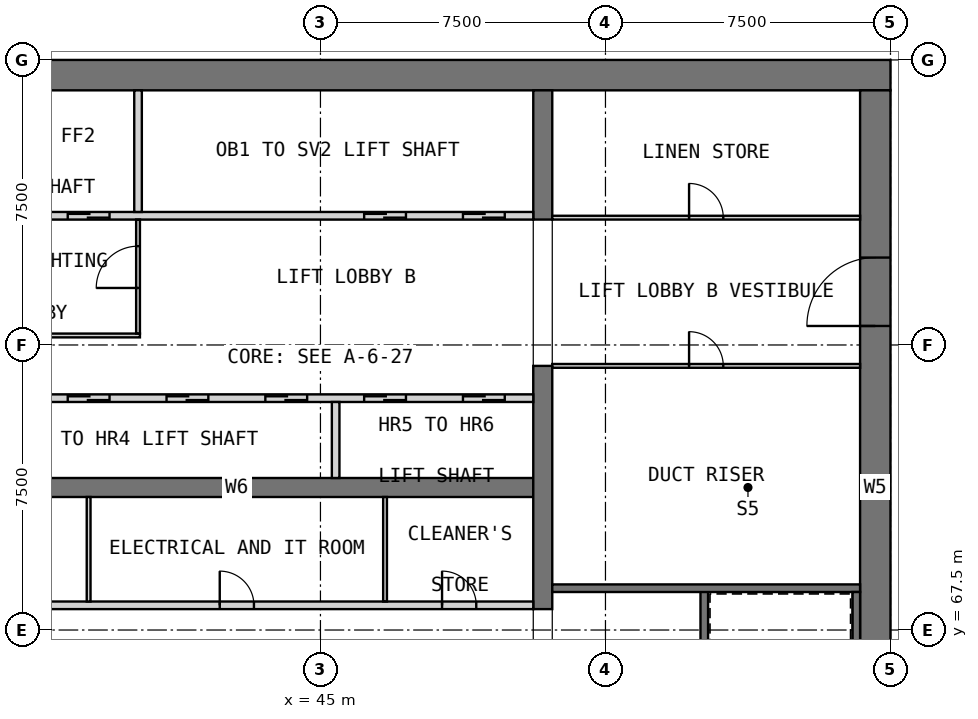
"""IFC4 building model, lengths in metres.
Left out: names, types, materials, properties, quantities, classifications, styles, units other than length and angle.
Written with IfcOpenShell. Run it as: python <this file> out.ifc"""

import sys

from ifc_helpers import new_model, si_unit, direction, frame, frame_2d, origin, place, context, subcontext, project, spatial, rectangle, extrude, element, fill, save


model = new_model("IFC4")
c1 = context("Model", 3, precision=1e-05, world=origin(), true_north=direction((0.0, 1.0)))
c2 = subcontext(c1, "Body", "Model", "MODEL_VIEW")
j1 = project(units=[si_unit("LENGTHUNIT", "METRE"), si_unit("PLANEANGLEUNIT", "RADIAN")], contexts=[c1])
p1 = place(None, origin())
s1 = spatial("IfcSite", under=j1, at=p1, CompositionType="ELEMENT")
p2 = place(p1, origin())
s2 = spatial("IfcBuilding", under=s1, at=p2, CompositionType="ELEMENT")
p3 = place(p2, frame((0.0, 0.0, 189.7)))
s3 = spatial("IfcBuildingStorey", under=s2, at=p3, CompositionType="ELEMENT", Elevation=189.7)
p4 = place(p3, frame((30.0, 82.1, 0.0), z_axis=(0.0, 0.0, 1.0), x_axis=(1.0, 0.0, 0.0)))
e1 = element("IfcWall", 1, at=p4, inside=s3, PredefinedType="SHEAR", context=c2, shape_type="SweptSolid", body=[
    extrude(rectangle(XDim=30.0, YDim=0.8, at=frame_2d((15.0, 0.0))), origin(), (0.0, 0.0, 1.0), 3.5),
])
p5 = place(p3, frame((59.6, 60.8, 0.0), z_axis=(0.0, 0.0, 1.0), x_axis=(0.0, 1.0, 0.0)))
e2 = element("IfcWall", 2, at=p5, inside=s3, PredefinedType="SHEAR", context=c2, shape_type="SweptSolid", body=[
    extrude(rectangle(XDim=20.9, YDim=0.8, at=frame_2d((10.45, 0.0))), origin(), (0.0, 0.0, 1.0), 3.5),
])
p6 = place(p5, frame((14.7, 0.0, 0.0)))
e3 = element("IfcOpeningElement", 3, at=p6, cuts=e2, PredefinedType="OPENING", context=c2, shape_type="SweptSolid", body=[
    extrude(rectangle(XDim=1.8, YDim=2.1, at=frame_2d((0.9, 1.05))), frame((0.0, 0.41, 0.0), z_axis=(0.0, -1.0, 0.0), x_axis=(1.0, 0.0, 0.0)), (0.0, 0.0, 1.0), 0.82),
])
p7 = place(p3, frame((35.0, 71.25, 0.0), z_axis=(0.0, 0.0, 1.0), x_axis=(1.0, 0.0, 0.0)))
e4 = element("IfcWall", 4, at=p7, inside=s3, PredefinedType="SHEAR", context=c2, shape_type="SweptSolid", body=[
    extrude(rectangle(XDim=15.6, YDim=0.5, at=frame_2d((7.8, 0.0))), origin(), (0.0, 0.0, 1.0), 3.5),
])
p8 = place(p3, frame((50.85, 68.05, 0.0), z_axis=(0.0, 0.0, 1.0), x_axis=(0.0, 1.0, 0.0)))
e5 = element("IfcWall", 5, at=p8, inside=s3, PredefinedType="SHEAR", context=c2, shape_type="SweptSolid", body=[
    extrude(rectangle(XDim=6.4, YDim=0.5, at=frame_2d((3.2, 0.0))), origin(), (0.0, 0.0, 1.0), 3.5),
])
p9 = place(p3, frame((50.85, 78.3, 0.0), z_axis=(0.0, 0.0, 1.0), x_axis=(0.0, 1.0, 0.0)))
e6 = element("IfcWall", 6, at=p9, inside=s3, PredefinedType="SHEAR", context=c2, shape_type="SweptSolid", body=[
    extrude(rectangle(XDim=3.4, YDim=0.5, at=frame_2d((1.7, 0.0))), origin(), (0.0, 0.0, 1.0), 3.5),
])
p10 = place(p3, frame((35.0, 68.15, 0.0), z_axis=(0.0, 0.0, 1.0), x_axis=(1.0, 0.0, 0.0)))
e7 = element("IfcWall", 7, at=p10, inside=s3, PredefinedType="PARTITIONING", context=c2, shape_type="SweptSolid", body=[
    extrude(rectangle(XDim=15.6, YDim=0.2, at=frame_2d((7.8, 0.0))), origin(), (0.0, 0.0, 1.0), 3.25),
])
p11 = place(p10, frame((1.5, 0.0, 0.0)))
e8 = element("IfcOpeningElement", 8, at=p11, cuts=e7, PredefinedType="OPENING", context=c2, shape_type="SweptSolid", body=[
    extrude(rectangle(XDim=0.9, YDim=2.1, at=frame_2d((0.45, 1.05))), frame((0.0, 0.11, 0.0), z_axis=(0.0, -1.0, 0.0), x_axis=(1.0, 0.0, 0.0)), (0.0, 0.0, 1.0), 0.22),
])
p12 = place(p10, frame((7.35, 0.0, 0.0)))
e9 = element("IfcOpeningElement", 9, at=p12, cuts=e7, PredefinedType="OPENING", context=c2, shape_type="SweptSolid", body=[
    extrude(rectangle(XDim=0.9, YDim=2.1, at=frame_2d((0.45, 1.05))), frame((0.0, 0.11, 0.0), z_axis=(0.0, -1.0, 0.0), x_axis=(1.0, 0.0, 0.0)), (0.0, 0.0, 1.0), 0.22),
])
p13 = place(p10, frame((13.2, 0.0, 0.0)))
e10 = element("IfcOpeningElement", 10, at=p13, cuts=e7, PredefinedType="OPENING", context=c2, shape_type="SweptSolid", body=[
    extrude(rectangle(XDim=0.9, YDim=2.1, at=frame_2d((0.45, 1.05))), frame((0.0, 0.11, 0.0), z_axis=(0.0, -1.0, 0.0), x_axis=(1.0, 0.0, 0.0)), (0.0, 0.0, 1.0), 0.22),
])
for number, where, z_axis, x_axis in (
    (11, (38.9, 68.25, 0.0), (0.0, 0.0, 1.0), (0.0, 1.0, 0.0)),
    (12, (46.7, 68.25, 0.0), (0.0, 0.0, 1.0), (0.0, 1.0, 0.0)),
):
    element("IfcWall", number, at=place(p3, frame(where, z_axis=z_axis, x_axis=x_axis)), inside=s3, PredefinedType="PARTITIONING", context=c2, shape_type="SweptSolid", body=[
        extrude(rectangle(XDim=2.75, YDim=0.1, at=frame_2d((1.375, 0.0))), origin(), (0.0, 0.0, 1.0), 3.25),
    ])
p14 = place(p3, frame((35.0, 73.6, 0.0), z_axis=(0.0, 0.0, 1.0), x_axis=(1.0, 0.0, 0.0)))
e13 = element("IfcWall", 13, at=p14, inside=s3, PredefinedType="SOLIDWALL", context=c2, shape_type="SweptSolid", body=[
    extrude(rectangle(XDim=15.6, YDim=0.2, at=frame_2d((7.8, 0.0))), origin(), (0.0, 0.0, 1.0), 3.5),
])
p15 = place(p14, frame((0.75, 0.0, 0.0)))
e14 = element("IfcOpeningElement", 14, at=p15, cuts=e13, PredefinedType="OPENING", context=c2, shape_type="SweptSolid", body=[
    extrude(rectangle(XDim=1.1, YDim=2.1, at=frame_2d((0.55, 1.05))), frame((0.0, 0.11, 0.0), z_axis=(0.0, -1.0, 0.0), x_axis=(1.0, 0.0, 0.0)), (0.0, 0.0, 1.0), 0.22),
])
p16 = place(p14, frame((3.35, 0.0, 0.0)))
e15 = element("IfcOpeningElement", 15, at=p16, cuts=e13, PredefinedType="OPENING", context=c2, shape_type="SweptSolid", body=[
    extrude(rectangle(XDim=1.1, YDim=2.1, at=frame_2d((0.55, 1.05))), frame((0.0, 0.11, 0.0), z_axis=(0.0, -1.0, 0.0), x_axis=(1.0, 0.0, 0.0)), (0.0, 0.0, 1.0), 0.22),
])
p17 = place(p14, frame((5.95, 0.0, 0.0)))
e16 = element("IfcOpeningElement", 16, at=p17, cuts=e13, PredefinedType="OPENING", context=c2, shape_type="SweptSolid", body=[
    extrude(rectangle(XDim=1.1, YDim=2.1, at=frame_2d((0.55, 1.05))), frame((0.0, 0.11, 0.0), z_axis=(0.0, -1.0, 0.0), x_axis=(1.0, 0.0, 0.0)), (0.0, 0.0, 1.0), 0.22),
])
p18 = place(p14, frame((8.55, 0.0, 0.0)))
e17 = element("IfcOpeningElement", 17, at=p18, cuts=e13, PredefinedType="OPENING", context=c2, shape_type="SweptSolid", body=[
    extrude(rectangle(XDim=1.1, YDim=2.1, at=frame_2d((0.55, 1.05))), frame((0.0, 0.11, 0.0), z_axis=(0.0, -1.0, 0.0), x_axis=(1.0, 0.0, 0.0)), (0.0, 0.0, 1.0), 0.22),
])
p19 = place(p14, frame((11.15, 0.0, 0.0)))
e18 = element("IfcOpeningElement", 18, at=p19, cuts=e13, PredefinedType="OPENING", context=c2, shape_type="SweptSolid", body=[
    extrude(rectangle(XDim=1.1, YDim=2.1, at=frame_2d((0.55, 1.05))), frame((0.0, 0.11, 0.0), z_axis=(0.0, -1.0, 0.0), x_axis=(1.0, 0.0, 0.0)), (0.0, 0.0, 1.0), 0.22),
])
p20 = place(p14, frame((13.75, 0.0, 0.0)))
e19 = element("IfcOpeningElement", 19, at=p20, cuts=e13, PredefinedType="OPENING", context=c2, shape_type="SweptSolid", body=[
    extrude(rectangle(XDim=1.1, YDim=2.1, at=frame_2d((0.55, 1.05))), frame((0.0, 0.11, 0.0), z_axis=(0.0, -1.0, 0.0), x_axis=(1.0, 0.0, 0.0)), (0.0, 0.0, 1.0), 0.22),
])
p21 = place(p3, frame((45.4, 71.5, 0.0), z_axis=(0.0, 0.0, 1.0), x_axis=(0.0, 1.0, 0.0)))
e20 = element("IfcWall", 20, at=p21, inside=s3, PredefinedType="SOLIDWALL", context=c2, shape_type="SweptSolid", body=[
    extrude(rectangle(XDim=2.0, YDim=0.2, at=frame_2d((1.0, 0.0))), origin(), (0.0, 0.0, 1.0), 3.5),
])
p22 = place(p3, frame((35.0, 78.4, 0.0), z_axis=(0.0, 0.0, 1.0), x_axis=(1.0, 0.0, 0.0)))
e21 = element("IfcWall", 21, at=p22, inside=s3, PredefinedType="SOLIDWALL", context=c2, shape_type="SweptSolid", body=[
    extrude(rectangle(XDim=15.6, YDim=0.2, at=frame_2d((7.8, 0.0))), origin(), (0.0, 0.0, 1.0), 3.5),
])
p23 = place(p22, frame((0.75, 0.0, 0.0)))
e22 = element("IfcOpeningElement", 22, at=p23, cuts=e21, PredefinedType="OPENING", context=c2, shape_type="SweptSolid", body=[
    extrude(rectangle(XDim=1.1, YDim=2.1, at=frame_2d((0.55, 1.05))), frame((0.0, 0.11, 0.0), z_axis=(0.0, -1.0, 0.0), x_axis=(1.0, 0.0, 0.0)), (0.0, 0.0, 1.0), 0.22),
])
p24 = place(p22, frame((3.35, 0.0, 0.0)))
e23 = element("IfcOpeningElement", 23, at=p24, cuts=e21, PredefinedType="OPENING", context=c2, shape_type="SweptSolid", body=[
    extrude(rectangle(XDim=1.1, YDim=2.1, at=frame_2d((0.55, 1.05))), frame((0.0, 0.11, 0.0), z_axis=(0.0, -1.0, 0.0), x_axis=(1.0, 0.0, 0.0)), (0.0, 0.0, 1.0), 0.22),
])
p25 = place(p22, frame((11.15, 0.0, 0.0)))
e24 = element("IfcOpeningElement", 24, at=p25, cuts=e21, PredefinedType="OPENING", context=c2, shape_type="SweptSolid", body=[
    extrude(rectangle(XDim=1.1, YDim=2.1, at=frame_2d((0.55, 1.05))), frame((0.0, 0.11, 0.0), z_axis=(0.0, -1.0, 0.0), x_axis=(1.0, 0.0, 0.0)), (0.0, 0.0, 1.0), 0.22),
])
p26 = place(p22, frame((13.75, 0.0, 0.0)))
e25 = element("IfcOpeningElement", 25, at=p26, cuts=e21, PredefinedType="OPENING", context=c2, shape_type="SweptSolid", body=[
    extrude(rectangle(XDim=1.1, YDim=2.1, at=frame_2d((0.55, 1.05))), frame((0.0, 0.11, 0.0), z_axis=(0.0, -1.0, 0.0), x_axis=(1.0, 0.0, 0.0)), (0.0, 0.0, 1.0), 0.22),
])
p27 = place(p3, frame((40.2, 78.5, 0.0), z_axis=(0.0, 0.0, 1.0), x_axis=(0.0, 1.0, 0.0)))
e26 = element("IfcWall", 26, at=p27, inside=s3, PredefinedType="SOLIDWALL", context=c2, shape_type="SweptSolid", body=[
    extrude(rectangle(XDim=3.2, YDim=0.2, at=frame_2d((1.6, 0.0))), origin(), (0.0, 0.0, 1.0), 3.5),
])
p28 = place(p3, frame((35.0, 75.25, 0.0), z_axis=(0.0, 0.0, 1.0), x_axis=(1.0, 0.0, 0.0)))
e27 = element("IfcWall", 27, at=p28, inside=s3, PredefinedType="PARTITIONING", context=c2, shape_type="SweptSolid", body=[
    extrude(rectangle(XDim=5.25, YDim=0.1, at=frame_2d((2.625, 0.0))), origin(), (0.0, 0.0, 1.0), 3.25),
])
p29 = place(p3, frame((40.2, 75.3, 0.0), z_axis=(0.0, 0.0, 1.0), x_axis=(0.0, 1.0, 0.0)))
e28 = element("IfcWall", 28, at=p29, inside=s3, PredefinedType="PARTITIONING", context=c2, shape_type="SweptSolid", body=[
    extrude(rectangle(XDim=3.0, YDim=0.1, at=frame_2d((1.5, 0.0))), origin(), (0.0, 0.0, 1.0), 3.25),
])
p30 = place(p29, frame((1.2, 0.0, 0.0)))
e29 = element("IfcOpeningElement", 29, at=p30, cuts=e28, PredefinedType="OPENING", context=c2, shape_type="SweptSolid", body=[
    extrude(rectangle(XDim=1.1, YDim=2.1, at=frame_2d((0.55, 1.05))), frame((0.0, 0.06, 0.0), z_axis=(0.0, -1.0, 0.0), x_axis=(1.0, 0.0, 0.0)), (0.0, 0.0, 1.0), 0.12),
])
p31 = place(p3, frame((55.1, 60.8, 0.0), z_axis=(0.0, 0.0, 1.0), x_axis=(0.0, 1.0, 0.0)))
e30 = element("IfcWall", 30, at=p31, inside=s3, PredefinedType="SOLIDWALL", context=c2, shape_type="SweptSolid", body=[
    extrude(rectangle(XDim=7.8, YDim=0.2, at=frame_2d((3.9, 0.0))), origin(), (0.0, 0.0, 1.0), 3.25),
])
p32 = place(p3, frame((51.1, 68.6, 0.0), z_axis=(0.0, 0.0, 1.0), x_axis=(1.0, 0.0, 0.0)))
e31 = element("IfcWall", 31, at=p32, inside=s3, PredefinedType="SOLIDWALL", context=c2, shape_type="SweptSolid", body=[
    extrude(rectangle(XDim=8.1, YDim=0.2, at=frame_2d((4.05, 0.0))), origin(), (0.0, 0.0, 1.0), 3.25),
])
p33 = place(p3, frame((59.1, 60.8, 0.0), z_axis=(0.0, 0.0, 1.0), x_axis=(0.0, 1.0, 0.0)))
e32 = element("IfcWall", 32, at=p33, inside=s3, PredefinedType="SOLIDWALL", context=c2, shape_type="SweptSolid", body=[
    extrude(rectangle(XDim=7.7, YDim=0.2, at=frame_2d((3.85, 0.0))), origin(), (0.0, 0.0, 1.0), 3.25),
])
p34 = place(p3, frame((51.1, 74.45, 0.0), z_axis=(0.0, 0.0, 1.0), x_axis=(1.0, 0.0, 0.0)))
e33 = element("IfcWall", 33, at=p34, inside=s3, PredefinedType="PARTITIONING", context=c2, shape_type="SweptSolid", body=[
    extrude(rectangle(XDim=8.1, YDim=0.1, at=frame_2d((4.05, 0.0))), origin(), (0.0, 0.0, 1.0), 3.25),
])
p35 = place(p34, frame((3.6, 0.0, 0.0)))
e34 = element("IfcOpeningElement", 34, at=p35, cuts=e33, PredefinedType="OPENING", context=c2, shape_type="SweptSolid", body=[
    extrude(rectangle(XDim=0.9, YDim=2.1, at=frame_2d((0.45, 1.05))), frame((0.0, 0.06, 0.0), z_axis=(0.0, -1.0, 0.0), x_axis=(1.0, 0.0, 0.0)), (0.0, 0.0, 1.0), 0.12),
])
p36 = place(p3, frame((51.1, 78.35, 0.0), z_axis=(0.0, 0.0, 1.0), x_axis=(1.0, 0.0, 0.0)))
e35 = element("IfcWall", 35, at=p36, inside=s3, PredefinedType="PARTITIONING", context=c2, shape_type="SweptSolid", body=[
    extrude(rectangle(XDim=8.1, YDim=0.1, at=frame_2d((4.05, 0.0))), origin(), (0.0, 0.0, 1.0), 3.25),
])
p37 = place(p36, frame((3.6, 0.0, 0.0)))
e36 = element("IfcOpeningElement", 36, at=p37, cuts=e35, PredefinedType="OPENING", context=c2, shape_type="SweptSolid", body=[
    extrude(rectangle(XDim=0.9, YDim=2.1, at=frame_2d((0.45, 1.05))), frame((0.0, 0.06, 0.0), z_axis=(0.0, -1.0, 0.0), x_axis=(1.0, 0.0, 0.0)), (0.0, 0.0, 1.0), 0.12),
])
p38 = place(p12, origin())
e37 = element("IfcDoor", 37, at=p38, inside=s3, OperationType="SINGLE_SWING_LEFT", PredefinedType="DOOR", context=c2, shape_type="SweptSolid", body=[
    extrude(rectangle(XDim=0.9, YDim=2.1, at=frame_2d((0.45, 1.05))), frame((0.0, 0.025, 0.0), z_axis=(0.0, -1.0, 0.0), x_axis=(1.0, 0.0, 0.0)), (0.0, 0.0, 1.0), 0.05),
])
fill(e9, e37)
p39 = place(p13, origin())
e38 = element("IfcDoor", 38, at=p39, inside=s3, OperationType="SINGLE_SWING_RIGHT", PredefinedType="DOOR", context=c2, shape_type="SweptSolid", body=[
    extrude(rectangle(XDim=0.9, YDim=2.1, at=frame_2d((0.45, 1.05))), frame((0.0, 0.025, 0.0), z_axis=(0.0, -1.0, 0.0), x_axis=(1.0, 0.0, 0.0)), (0.0, 0.0, 1.0), 0.05),
])
fill(e10, e38)
p40 = place(p16, origin())
e39 = element("IfcDoor", 39, at=p40, inside=s3, OperationType="DOUBLE_DOOR_SLIDING", PredefinedType="DOOR", context=c2, shape_type="SweptSolid", body=[
    extrude(rectangle(XDim=1.1, YDim=2.1, at=frame_2d((0.55, 1.05))), frame((0.0, 0.025, 0.0), z_axis=(0.0, -1.0, 0.0), x_axis=(1.0, 0.0, 0.0)), (0.0, 0.0, 1.0), 0.05),
])
fill(e15, e39)
p41 = place(p17, origin())
e40 = element("IfcDoor", 40, at=p41, inside=s3, OperationType="DOUBLE_DOOR_SLIDING", PredefinedType="DOOR", context=c2, shape_type="SweptSolid", body=[
    extrude(rectangle(XDim=1.1, YDim=2.1, at=frame_2d((0.55, 1.05))), frame((0.0, 0.025, 0.0), z_axis=(0.0, -1.0, 0.0), x_axis=(1.0, 0.0, 0.0)), (0.0, 0.0, 1.0), 0.05),
])
fill(e16, e40)
p42 = place(p18, origin())
e41 = element("IfcDoor", 41, at=p42, inside=s3, OperationType="DOUBLE_DOOR_SLIDING", PredefinedType="DOOR", context=c2, shape_type="SweptSolid", body=[
    extrude(rectangle(XDim=1.1, YDim=2.1, at=frame_2d((0.55, 1.05))), frame((0.0, 0.025, 0.0), z_axis=(0.0, -1.0, 0.0), x_axis=(1.0, 0.0, 0.0)), (0.0, 0.0, 1.0), 0.05),
])
fill(e17, e41)
p43 = place(p19, origin())
e42 = element("IfcDoor", 42, at=p43, inside=s3, OperationType="DOUBLE_DOOR_SLIDING", PredefinedType="DOOR", context=c2, shape_type="SweptSolid", body=[
    extrude(rectangle(XDim=1.1, YDim=2.1, at=frame_2d((0.55, 1.05))), frame((0.0, 0.025, 0.0), z_axis=(0.0, -1.0, 0.0), x_axis=(1.0, 0.0, 0.0)), (0.0, 0.0, 1.0), 0.05),
])
fill(e18, e42)
p44 = place(p20, origin())
e43 = element("IfcDoor", 43, at=p44, inside=s3, OperationType="DOUBLE_DOOR_SLIDING", PredefinedType="DOOR", context=c2, shape_type="SweptSolid", body=[
    extrude(rectangle(XDim=1.1, YDim=2.1, at=frame_2d((0.55, 1.05))), frame((0.0, 0.025, 0.0), z_axis=(0.0, -1.0, 0.0), x_axis=(1.0, 0.0, 0.0)), (0.0, 0.0, 1.0), 0.05),
])
fill(e19, e43)
p45 = place(p24, origin())
e44 = element("IfcDoor", 44, at=p45, inside=s3, OperationType="DOUBLE_DOOR_SLIDING", PredefinedType="DOOR", context=c2, shape_type="SweptSolid", body=[
    extrude(rectangle(XDim=1.1, YDim=2.1, at=frame_2d((0.55, 1.05))), frame((0.0, 0.025, 0.0), z_axis=(0.0, -1.0, 0.0), x_axis=(1.0, 0.0, 0.0)), (0.0, 0.0, 1.0), 0.05),
])
fill(e23, e44)
p46 = place(p25, origin())
e45 = element("IfcDoor", 45, at=p46, inside=s3, OperationType="DOUBLE_DOOR_SLIDING", PredefinedType="DOOR", context=c2, shape_type="SweptSolid", body=[
    extrude(rectangle(XDim=1.1, YDim=2.1, at=frame_2d((0.55, 1.05))), frame((0.0, 0.025, 0.0), z_axis=(0.0, -1.0, 0.0), x_axis=(1.0, 0.0, 0.0)), (0.0, 0.0, 1.0), 0.05),
])
fill(e24, e45)
p47 = place(p26, origin())
e46 = element("IfcDoor", 46, at=p47, inside=s3, OperationType="DOUBLE_DOOR_SLIDING", PredefinedType="DOOR", context=c2, shape_type="SweptSolid", body=[
    extrude(rectangle(XDim=1.1, YDim=2.1, at=frame_2d((0.55, 1.05))), frame((0.0, 0.025, 0.0), z_axis=(0.0, -1.0, 0.0), x_axis=(1.0, 0.0, 0.0)), (0.0, 0.0, 1.0), 0.05),
])
fill(e25, e46)
p48 = place(p6, origin())
e47 = element("IfcDoor", 47, at=p48, inside=s3, OperationType="DOUBLE_DOOR_SINGLE_SWING", PredefinedType="DOOR", context=c2, shape_type="SweptSolid", body=[
    extrude(rectangle(XDim=1.8, YDim=2.1, at=frame_2d((0.9, 1.05))), frame((0.0, 0.025, 0.0), z_axis=(0.0, -1.0, 0.0), x_axis=(1.0, 0.0, 0.0)), (0.0, 0.0, 1.0), 0.05),
])
fill(e3, e47)
p49 = place(p30, origin())
e48 = element("IfcDoor", 48, at=p49, inside=s3, OperationType="SINGLE_SWING_LEFT", PredefinedType="DOOR", context=c2, shape_type="SweptSolid", body=[
    extrude(rectangle(XDim=1.1, YDim=2.1, at=frame_2d((0.55, 1.05))), frame((0.0, 0.025, 0.0), z_axis=(0.0, -1.0, 0.0), x_axis=(1.0, 0.0, 0.0)), (0.0, 0.0, 1.0), 0.05),
])
fill(e29, e48)
p50 = place(p35, origin())
e49 = element("IfcDoor", 49, at=p50, inside=s3, OperationType="SINGLE_SWING_RIGHT", PredefinedType="DOOR", context=c2, shape_type="SweptSolid", body=[
    extrude(rectangle(XDim=0.9, YDim=2.1, at=frame_2d((0.45, 1.05))), frame((0.0, 0.025, 0.0), z_axis=(0.0, -1.0, 0.0), x_axis=(1.0, 0.0, 0.0)), (0.0, 0.0, 1.0), 0.05),
])
fill(e34, e49)
p51 = place(p37, origin())
e50 = element("IfcDoor", 50, at=p51, inside=s3, OperationType="SINGLE_SWING_RIGHT", PredefinedType="DOOR", context=c2, shape_type="SweptSolid", body=[
    extrude(rectangle(XDim=0.9, YDim=2.1, at=frame_2d((0.45, 1.05))), frame((0.0, 0.025, 0.0), z_axis=(0.0, -1.0, 0.0), x_axis=(1.0, 0.0, 0.0)), (0.0, 0.0, 1.0), 0.05),
])
fill(e36, e50)
save(model, sys.argv[1])
